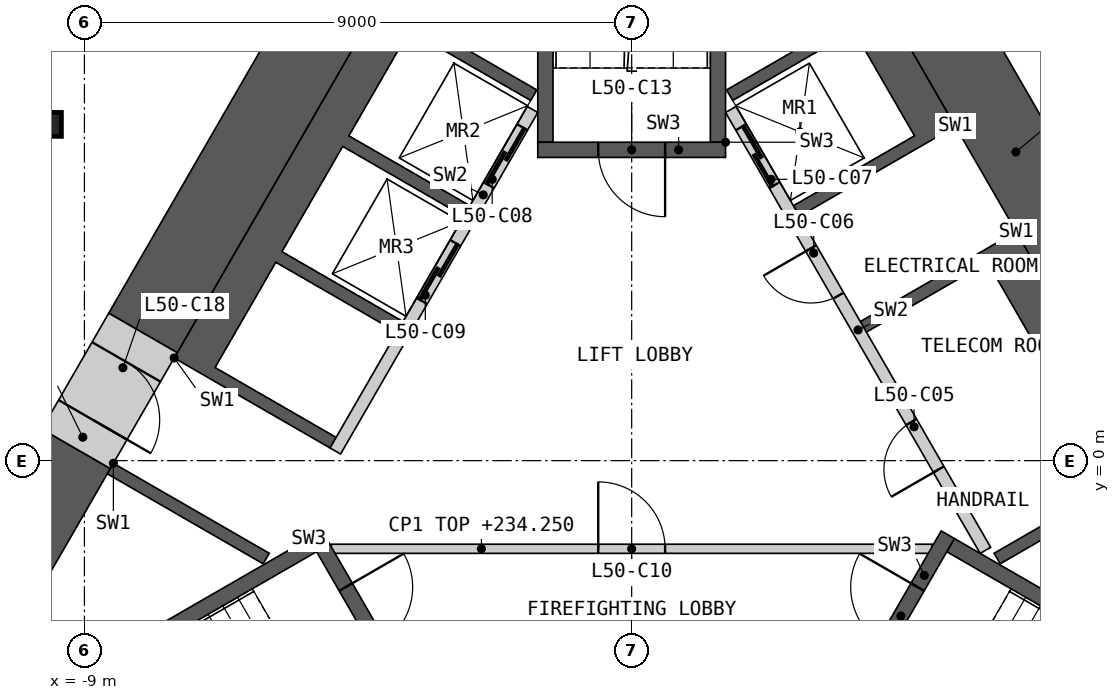
"""IFC4 building model, lengths in metres.
Left out: names, types, materials, properties, quantities, classifications, styles, units other than length and angle.
Written with IfcOpenShell. Run it as: python <this file> out.ifc"""

import sys

from ifc_helpers import new_model, si_unit, direction, frame, frame_2d, origin, origin_2d, place, context, subcontext, project, spatial, polyline, rectangle, i_section, outline, extrude, element, fill, save


model = new_model("IFC4")
c1 = context("Model", 3, precision=1e-05, world=origin(), true_north=direction((0.0, 1.0)))
c2 = subcontext(c1, "Body", "Model", "MODEL_VIEW")
j1 = project(units=[si_unit("LENGTHUNIT", "METRE"), si_unit("PLANEANGLEUNIT", "RADIAN")], contexts=[c1])
p1 = place(None, origin())
s1 = spatial("IfcSite", under=j1, at=p1, CompositionType="ELEMENT")
p2 = place(p1, origin())
s2 = spatial("IfcBuilding", under=s1, at=p2, CompositionType="ELEMENT")
p3 = place(p2, frame((0.0, 0.0, 231.0)))
s3 = spatial("IfcBuildingStorey", under=s2, at=p3, CompositionType="ELEMENT", Elevation=231.0)
p4 = place(p3, frame((-9.578, 5.53, 0.0), z_axis=(0.0, 0.0, 1.0), x_axis=(1.0, 0.0, 0.0)))
e1 = element("IfcColumn", 1, at=p4, inside=s3, PredefinedType="COLUMN", context=c2, shape_type="SweptSolid", body=[
    extrude(i_section(OverallWidth=0.399, OverallDepth=0.393, WebThickness=0.023, FlangeThickness=0.037, at=origin_2d()), origin(), (0.0, 0.0, 1.0), 3.6),
])
p5 = place(p3, origin())
e2 = element("IfcWall", 2, at=p5, inside=s3, PredefinedType="SHEAR", context=c2, shape_type="SweptSolid", body=[
    extrude(outline(polyline([(6.324, 3.767), (8.624, -0.217), (8.231, -0.444), (6.061, -1.697), (5.96, -1.524), (7.952, -0.374), (5.852, 3.263), (3.861, 2.113), (3.76, 2.287), (5.931, 3.54), (6.324, 3.767)])), origin(), (0.0, 0.0, 1.0), 3.25),
])
p6 = place(p3, origin())
e3 = element("IfcWall", 3, at=p6, inside=s3, PredefinedType="SHEAR", context=c2, shape_type="SweptSolid", body=[
    extrude(outline(polyline([(5.324, 5.499), (4.931, 5.272), (2.76, 4.019), (2.66, 4.192), (4.652, 5.342), (3.652, 7.074), (1.66, 5.924), (1.561, 6.097), (3.731, 7.35), (4.124, 7.577), (5.324, 5.499)])), origin(), (0.0, 0.0, 1.0), 3.25),
])
p7 = place(p3, frame((5.817, -1.476, 0.0), z_axis=(0.0, 0.0, 1.0), x_axis=(-0.500002616675, 0.866023893041, 0.0)))
e4 = element("IfcWall", 4, at=p7, inside=s3, PredefinedType="SOLIDWALL", context=c2, shape_type="SweptSolid", body=[
    extrude(rectangle(XDim=8.373, YDim=0.2, at=frame_2d((4.187, 0.0))), origin(), (0.0, 0.0, 1.0), 3.25),
])
p8 = place(p7, frame((1.537, 0.0, 0.0)))
e5 = element("IfcOpeningElement", 5, at=p8, cuts=e4, PredefinedType="OPENING", context=c2, shape_type="SweptSolid", body=[
    extrude(rectangle(XDim=0.9, YDim=2.1, at=frame_2d((0.45, 1.05))), frame((0.0, 0.11, 0.0), z_axis=(0.0, -1.0, 0.0), x_axis=(1.0, 0.0, 0.0)), (0.0, 0.0, 1.0), 0.22),
])
p9 = place(p7, frame((4.837, 0.0, 0.0)))
e6 = element("IfcOpeningElement", 6, at=p9, cuts=e4, PredefinedType="OPENING", context=c2, shape_type="SweptSolid", body=[
    extrude(rectangle(XDim=0.9, YDim=2.1, at=frame_2d((0.45, 1.05))), frame((0.0, 0.11, 0.0), z_axis=(0.0, -1.0, 0.0), x_axis=(1.0, 0.0, 0.0)), (0.0, 0.0, 1.0), 0.22),
])
p10 = place(p7, frame((6.937, 0.0, 0.0)))
e7 = element("IfcOpeningElement", 7, at=p10, cuts=e4, PredefinedType="OPENING", context=c2, shape_type="SweptSolid", body=[
    extrude(rectangle(XDim=1.1, YDim=2.1, at=frame_2d((0.55, 1.05))), frame((0.0, 0.11, 0.0), z_axis=(0.0, -1.0, 0.0), x_axis=(1.0, 0.0, 0.0)), (0.0, 0.0, 1.0), 0.22),
])
p11 = place(p3, origin())
e8 = element("IfcWall", 8, at=p11, inside=s3, PredefinedType="SHEAR", context=c2, shape_type="SweptSolid", body=[
    extrude(outline(polyline([(-7.524, 1.688), (-4.124, 7.577), (-3.731, 7.35), (-1.561, 6.097), (-1.66, 5.924), (-3.652, 7.074), (-4.652, 5.342), (-2.66, 4.192), (-2.76, 4.019), (-4.752, 5.169), (-5.752, 3.437), (-3.76, 2.287), (-3.861, 2.113), (-5.852, 3.263), (-6.852, 1.531), (-4.861, 0.381), (-4.96, 0.208), (-7.131, 1.461), (-7.524, 1.688)])), origin(), (0.0, 0.0, 1.0), 3.25),
])
p12 = place(p3, origin())
e9 = element("IfcWall", 9, at=p12, inside=s3, PredefinedType="SHEAR", context=c2, shape_type="SweptSolid", body=[
    extrude(outline(polyline([(-8.524, -0.044), (-8.131, -0.271), (-5.96, -1.524), (-6.061, -1.697), (-8.231, -0.444), (-8.624, -0.217), (-8.524, -0.044)])), origin(), (0.0, 0.0, 1.0), 3.25),
])
p13 = place(p3, frame((-1.631, 5.776, 0.0), z_axis=(0.0, 0.0, 1.0), x_axis=(-0.499992876559, -0.866029516466, 0.0)))
e10 = element("IfcWall", 10, at=p13, inside=s3, PredefinedType="SOLIDWALL", context=c2, shape_type="SweptSolid", body=[
    extrude(rectangle(XDim=6.486, YDim=0.2, at=frame_2d((3.243, 0.0))), origin(), (0.0, 0.0, 1.0), 3.25),
])
p14 = place(p13, frame((0.337, 0.0, 0.0)))
e11 = element("IfcOpeningElement", 11, at=p14, cuts=e10, PredefinedType="OPENING", context=c2, shape_type="SweptSolid", body=[
    extrude(rectangle(XDim=1.1, YDim=2.1, at=frame_2d((0.55, 1.05))), frame((0.0, 0.11, 0.0), z_axis=(0.0, -1.0, 0.0), x_axis=(1.0, 0.0, 0.0)), (0.0, 0.0, 1.0), 0.22),
])
p15 = place(p13, frame((2.537, 0.0, 0.0)))
e12 = element("IfcOpeningElement", 12, at=p15, cuts=e10, PredefinedType="OPENING", context=c2, shape_type="SweptSolid", body=[
    extrude(rectangle(XDim=1.1, YDim=2.1, at=frame_2d((0.55, 1.05))), frame((0.0, 0.11, 0.0), z_axis=(0.0, -1.0, 0.0), x_axis=(1.0, 0.0, 0.0)), (0.0, 0.0, 1.0), 0.22),
])
p16 = place(p3, frame((-4.941, -1.45, 0.0), z_axis=(0.0, 0.0, 1.0), x_axis=(1.0, 0.0, 0.0)))
e13 = element("IfcWall", 13, at=p16, inside=s3, PredefinedType="PARTITIONING", context=c2, shape_type="SweptSolid", body=[
    extrude(rectangle(XDim=9.882, YDim=0.15, at=frame_2d((4.941, 0.0))), origin(), (0.0, 0.0, 1.0), 3.25),
])
p17 = place(p16, frame((4.391, 0.0, 0.0)))
e14 = element("IfcOpeningElement", 14, at=p17, cuts=e13, PredefinedType="OPENING", context=c2, shape_type="SweptSolid", body=[
    extrude(rectangle(XDim=1.1, YDim=2.1, at=frame_2d((0.55, 1.05))), frame((0.0, 0.085, 0.0), z_axis=(0.0, -1.0, 0.0), x_axis=(1.0, 0.0, 0.0)), (0.0, 0.0, 1.0), 0.17),
])
p18 = place(p3, origin())
e15 = element("IfcWall", 15, at=p18, inside=s3, PredefinedType="SHEAR", context=c2, shape_type="SweptSolid", body=[
    extrude(outline(polyline([(-5.307, -1.281), (-10.374, -4.206), (-10.032, -4.298), (-5.182, -1.498), (-5.307, -1.281)])), origin(), (0.0, 0.0, 1.0), 3.25),
])
p19 = place(p3, frame((-5.199, -1.219, 0.0), z_axis=(0.0, 0.0, 1.0), x_axis=(0.499982516597, -0.866035497597, 0.0)))
e16 = element("IfcWall", 16, at=p19, inside=s3, PredefinedType="SHEAR", context=c2, shape_type="SweptSolid", body=[
    extrude(rectangle(XDim=3.088, YDim=0.25, at=frame_2d((1.544, 0.0))), origin(), (0.0, 0.0, 1.0), 3.25),
])
p20 = place(p19, frame((0.994, 0.0, 0.0)))
e17 = element("IfcOpeningElement", 17, at=p20, cuts=e16, PredefinedType="OPENING", context=c2, shape_type="SweptSolid", body=[
    extrude(rectangle(XDim=1.1, YDim=2.1, at=frame_2d((0.55, 1.05))), frame((0.0, 0.135, 0.0), z_axis=(0.0, -1.0, 0.0), x_axis=(1.0, 0.0, 0.0)), (0.0, 0.0, 1.0), 0.27),
])
p21 = place(p3, origin())
e18 = element("IfcWall", 18, at=p21, inside=s3, PredefinedType="SHEAR", context=c2, shape_type="SweptSolid", body=[
    extrude(outline(polyline([(10.032, -4.298), (10.374, -4.206), (5.307, -1.281), (5.182, -1.498), (10.032, -4.298)])), origin(), (0.0, 0.0, 1.0), 3.25),
])
p22 = place(p3, frame((3.655, -3.893, 0.0), z_axis=(0.0, 0.0, 1.0), x_axis=(0.499982516597, 0.866035497597, 0.0)))
e19 = element("IfcWall", 19, at=p22, inside=s3, PredefinedType="SHEAR", context=c2, shape_type="SweptSolid", body=[
    extrude(rectangle(XDim=3.088, YDim=0.25, at=frame_2d((1.544, 0.0))), origin(), (0.0, 0.0, 1.0), 3.25),
])
p23 = place(p22, frame((0.994, 0.0, 0.0)))
e20 = element("IfcOpeningElement", 20, at=p23, cuts=e19, PredefinedType="OPENING", context=c2, shape_type="SweptSolid", body=[
    extrude(rectangle(XDim=1.1, YDim=2.1, at=frame_2d((0.55, 1.05))), frame((0.0, 0.135, 0.0), z_axis=(0.0, -1.0, 0.0), x_axis=(1.0, 0.0, 0.0)), (0.0, 0.0, 1.0), 0.27),
])
p24 = place(p3, origin())
e21 = element("IfcWall", 21, at=p24, inside=s3, PredefinedType="SHEAR", context=c2, shape_type="SweptSolid", body=[
    extrude(outline(polyline([(1.544, 5.237), (1.544, 11.087), (1.294, 10.837), (1.294, 5.237), (1.544, 5.237)])), origin(), (0.0, 0.0, 1.0), 3.25),
])
p25 = place(p3, origin())
e22 = element("IfcWall", 22, at=p25, inside=s3, PredefinedType="SHEAR", context=c2, shape_type="SweptSolid", body=[
    extrude(outline(polyline([(-1.294, 10.837), (-1.544, 11.087), (-1.544, 5.237), (-1.294, 5.237), (-1.294, 10.837)])), origin(), (0.0, 0.0, 1.0), 3.25),
])
p26 = place(p3, frame((1.544, 5.112, 0.0), z_axis=(0.0, 0.0, 1.0), x_axis=(-1.0, 0.0, 0.0)))
e23 = element("IfcWall", 23, at=p26, inside=s3, PredefinedType="SHEAR", context=c2, shape_type="SweptSolid", body=[
    extrude(rectangle(XDim=3.088, YDim=0.25, at=frame_2d((1.544, 0.0))), origin(), (0.0, 0.0, 1.0), 3.25),
])
p27 = place(p26, frame((0.994, 0.0, 0.0)))
e24 = element("IfcOpeningElement", 24, at=p27, cuts=e23, PredefinedType="OPENING", context=c2, shape_type="SweptSolid", body=[
    extrude(rectangle(XDim=1.1, YDim=2.1, at=frame_2d((0.55, 1.05))), frame((0.0, 0.135, 0.0), z_axis=(0.0, -1.0, 0.0), x_axis=(1.0, 0.0, 0.0)), (0.0, 0.0, 1.0), 0.27),
])
p28 = place(p3, frame((10.081, -1.441, 0.0), z_axis=(0.0, 0.0, 1.0), x_axis=(-0.500012180433, 0.866018371294, 0.0)))
e25 = element("IfcWall", 25, at=p28, inside=s3, PredefinedType="SHEAR", context=c2, shape_type="SweptSolid", body=[
    extrude(rectangle(XDim=15.05, YDim=1.3, at=frame_2d((7.525, 0.0))), origin(), (0.0, 0.0, 1.0), 3.25),
])
p29 = place(p3, frame((-4.636, 7.99, 0.0), z_axis=(0.0, 0.0, 1.0), x_axis=(-0.500022813292, -0.866012232124, 0.0)))
e26 = element("IfcWall", 26, at=p29, inside=s3, PredefinedType="SHEAR", context=c2, shape_type="SweptSolid", body=[
    extrude(rectangle(XDim=6.802, YDim=1.3, at=frame_2d((3.401, 0.0))), origin(), (0.0, 0.0, 1.0), 3.25),
])
p30 = place(p3, frame((-9.137, 0.195, 0.0), z_axis=(0.0, 0.0, 1.0), x_axis=(-0.499985697398, -0.866033661238, 0.0)))
e27 = element("IfcWall", 27, at=p30, inside=s3, PredefinedType="SHEAR", context=c2, shape_type="SweptSolid", body=[
    extrude(rectangle(XDim=4.362, YDim=1.3, at=frame_2d((2.181, 0.0))), origin(), (0.0, 0.0, 1.0), 3.25),
])
p31 = place(p3, frame((-8.037, 2.1, 0.0), z_axis=(0.0, 0.0, 1.0), x_axis=(-0.50002983664, -0.866008176907, 0.0)))
e28 = element("IfcWall", 28, at=p31, inside=s3, PredefinedType="SHEAR", context=c2, shape_type="SweptSolid", body=[
    extrude(rectangle(XDim=2.2, YDim=1.3, at=frame_2d((1.1, 0.0))), origin(), (0.0, 0.0, 1.0), 3.25),
])
p32 = place(p31, frame((0.55, 0.0, 0.0)))
e29 = element("IfcOpeningElement", 29, at=p32, cuts=e28, PredefinedType="OPENING", context=c2, shape_type="SweptSolid", body=[
    extrude(rectangle(XDim=1.1, YDim=2.1, at=frame_2d((0.55, 1.05))), frame((0.0, 0.66, 0.0), z_axis=(0.0, -1.0, 0.0), x_axis=(1.0, 0.0, 0.0)), (0.0, 0.0, 1.0), 1.32),
])
p33 = place(p3, frame((-18.976, -4.747, 0.0), z_axis=(0.0, 0.0, 1.0), x_axis=(0.499999852422, 0.866025488988, 0.0)))
e30 = element("IfcWall", 30, at=p33, inside=s3, PredefinedType="PARTITIONING", context=c2, shape_type="SweptSolid", body=[
    extrude(rectangle(XDim=27.198, YDim=0.2, at=frame_2d((13.599, 0.0))), origin(), (0.0, 0.0, 1.0), 3.25),
])
p34 = place(p33, frame((25.346, 0.0, 0.0)))
e31 = element("IfcOpeningElement", 31, at=p34, cuts=e30, PredefinedType="OPENING", context=c2, shape_type="SweptSolid", body=[
    extrude(rectangle(XDim=1.1, YDim=2.1, at=frame_2d((0.55, 1.05))), frame((0.0, 0.11, 0.0), z_axis=(0.0, -1.0, 0.0), x_axis=(1.0, 0.0, 0.0)), (0.0, 0.0, 1.0), 0.22),
])
p35 = place(p33, frame((16.713, 0.0, 0.0)))
e32 = element("IfcOpeningElement", 32, at=p35, cuts=e30, PredefinedType="OPENING", context=c2, shape_type="SweptSolid", body=[
    extrude(rectangle(XDim=1.1, YDim=2.1, at=frame_2d((0.55, 1.05))), frame((0.0, 0.11, 0.0), z_axis=(0.0, -1.0, 0.0), x_axis=(1.0, 0.0, 0.0)), (0.0, 0.0, 1.0), 0.22),
])
p36 = place(p33, frame((0.35, 0.0, 0.0)))
e33 = element("IfcOpeningElement", 33, at=p36, cuts=e30, PredefinedType="OPENING", context=c2, shape_type="SweptSolid", body=[
    extrude(rectangle(XDim=1.1, YDim=2.1, at=frame_2d((0.55, 1.05))), frame((0.0, 0.11, 0.0), z_axis=(0.0, -1.0, 0.0), x_axis=(1.0, 0.0, 0.0)), (0.0, 0.0, 1.0), 0.22),
])
p37 = place(p3, frame((4.91, 13.616, 0.0), z_axis=(0.0, 0.0, 1.0), x_axis=(0.50000207303, -0.866024206917, 0.0)))
e34 = element("IfcWall", 34, at=p37, inside=s3, PredefinedType="PARTITIONING", context=c2, shape_type="SweptSolid", body=[
    extrude(rectangle(XDim=9.095, YDim=0.2, at=frame_2d((4.547, 0.0))), origin(), (0.0, 0.0, 1.0), 3.25),
])
p38 = place(p8, origin())
e35 = element("IfcDoor", 35, at=p38, inside=s3, OperationType="SINGLE_SWING_LEFT", PredefinedType="DOOR", context=c2, shape_type="SweptSolid", body=[
    extrude(rectangle(XDim=0.9, YDim=2.1, at=frame_2d((0.45, 1.05))), frame((0.0, 0.025, 0.0), z_axis=(0.0, -1.0, 0.0), x_axis=(1.0, 0.0, 0.0)), (0.0, 0.0, 1.0), 0.05),
])
fill(e5, e35)
p39 = place(p9, origin())
e36 = element("IfcDoor", 36, at=p39, inside=s3, OperationType="SINGLE_SWING_RIGHT", PredefinedType="DOOR", context=c2, shape_type="SweptSolid", body=[
    extrude(rectangle(XDim=0.9, YDim=2.1, at=frame_2d((0.45, 1.05))), frame((0.0, 0.025, 0.0), z_axis=(0.0, -1.0, 0.0), x_axis=(1.0, 0.0, 0.0)), (0.0, 0.0, 1.0), 0.05),
])
fill(e6, e36)
p40 = place(p10, origin())
e37 = element("IfcDoor", 37, at=p40, inside=s3, OperationType="SLIDING_TO_LEFT", PredefinedType="DOOR", context=c2, shape_type="SweptSolid", body=[
    extrude(rectangle(XDim=1.1, YDim=2.1, at=frame_2d((0.55, 1.05))), frame((0.0, 0.025, 0.0), z_axis=(0.0, -1.0, 0.0), x_axis=(1.0, 0.0, 0.0)), (0.0, 0.0, 1.0), 0.05),
])
fill(e7, e37)
p41 = place(p14, origin())
e38 = element("IfcDoor", 38, at=p41, inside=s3, OperationType="SLIDING_TO_LEFT", PredefinedType="DOOR", context=c2, shape_type="SweptSolid", body=[
    extrude(rectangle(XDim=1.1, YDim=2.1, at=frame_2d((0.55, 1.05))), frame((0.0, 0.025, 0.0), z_axis=(0.0, -1.0, 0.0), x_axis=(1.0, 0.0, 0.0)), (0.0, 0.0, 1.0), 0.05),
])
fill(e11, e38)
p42 = place(p15, origin())
e39 = element("IfcDoor", 39, at=p42, inside=s3, OperationType="SLIDING_TO_LEFT", PredefinedType="DOOR", context=c2, shape_type="SweptSolid", body=[
    extrude(rectangle(XDim=1.1, YDim=2.1, at=frame_2d((0.55, 1.05))), frame((0.0, 0.025, 0.0), z_axis=(0.0, -1.0, 0.0), x_axis=(1.0, 0.0, 0.0)), (0.0, 0.0, 1.0), 0.05),
])
fill(e12, e39)
p43 = place(p17, origin())
e40 = element("IfcDoor", 40, at=p43, inside=s3, OperationType="SINGLE_SWING_LEFT", PredefinedType="DOOR", context=c2, shape_type="SweptSolid", body=[
    extrude(rectangle(XDim=1.1, YDim=2.1, at=frame_2d((0.55, 1.05))), frame((0.0, 0.025, 0.0), z_axis=(0.0, -1.0, 0.0), x_axis=(1.0, 0.0, 0.0)), (0.0, 0.0, 1.0), 0.05),
])
fill(e14, e40)
p44 = place(p20, origin())
e41 = element("IfcDoor", 41, at=p44, inside=s3, OperationType="SINGLE_SWING_LEFT", PredefinedType="DOOR", context=c2, shape_type="SweptSolid", body=[
    extrude(rectangle(XDim=1.1, YDim=2.1, at=frame_2d((0.55, 1.05))), frame((0.0, 0.025, 0.0), z_axis=(0.0, -1.0, 0.0), x_axis=(1.0, 0.0, 0.0)), (0.0, 0.0, 1.0), 0.05),
])
fill(e17, e41)
p45 = place(p23, origin())
e42 = element("IfcDoor", 42, at=p45, inside=s3, OperationType="SINGLE_SWING_RIGHT", PredefinedType="DOOR", context=c2, shape_type="SweptSolid", body=[
    extrude(rectangle(XDim=1.1, YDim=2.1, at=frame_2d((0.55, 1.05))), frame((0.0, 0.025, 0.0), z_axis=(0.0, -1.0, 0.0), x_axis=(1.0, 0.0, 0.0)), (0.0, 0.0, 1.0), 0.05),
])
fill(e20, e42)
p46 = place(p27, origin())
e43 = element("IfcDoor", 43, at=p46, inside=s3, OperationType="SINGLE_SWING_LEFT", PredefinedType="DOOR", context=c2, shape_type="SweptSolid", body=[
    extrude(rectangle(XDim=1.1, YDim=2.1, at=frame_2d((0.55, 1.05))), frame((0.0, 0.025, 0.0), z_axis=(0.0, -1.0, 0.0), x_axis=(1.0, 0.0, 0.0)), (0.0, 0.0, 1.0), 0.05),
])
fill(e24, e43)
p47 = place(p32, origin())
e44 = element("IfcDoor", 44, at=p47, inside=s3, OperationType="SINGLE_SWING_RIGHT", PredefinedType="DOOR", context=c2, shape_type="SweptSolid", body=[
    extrude(rectangle(XDim=1.1, YDim=2.1, at=frame_2d((0.55, 1.05))), frame((0.0, 0.405, 0.0), z_axis=(0.0, -1.0, 0.0), x_axis=(1.0, 0.0, 0.0)), (0.0, 0.0, 1.0), 0.05),
])
fill(e29, e44)
save(model, sys.argv[1])
